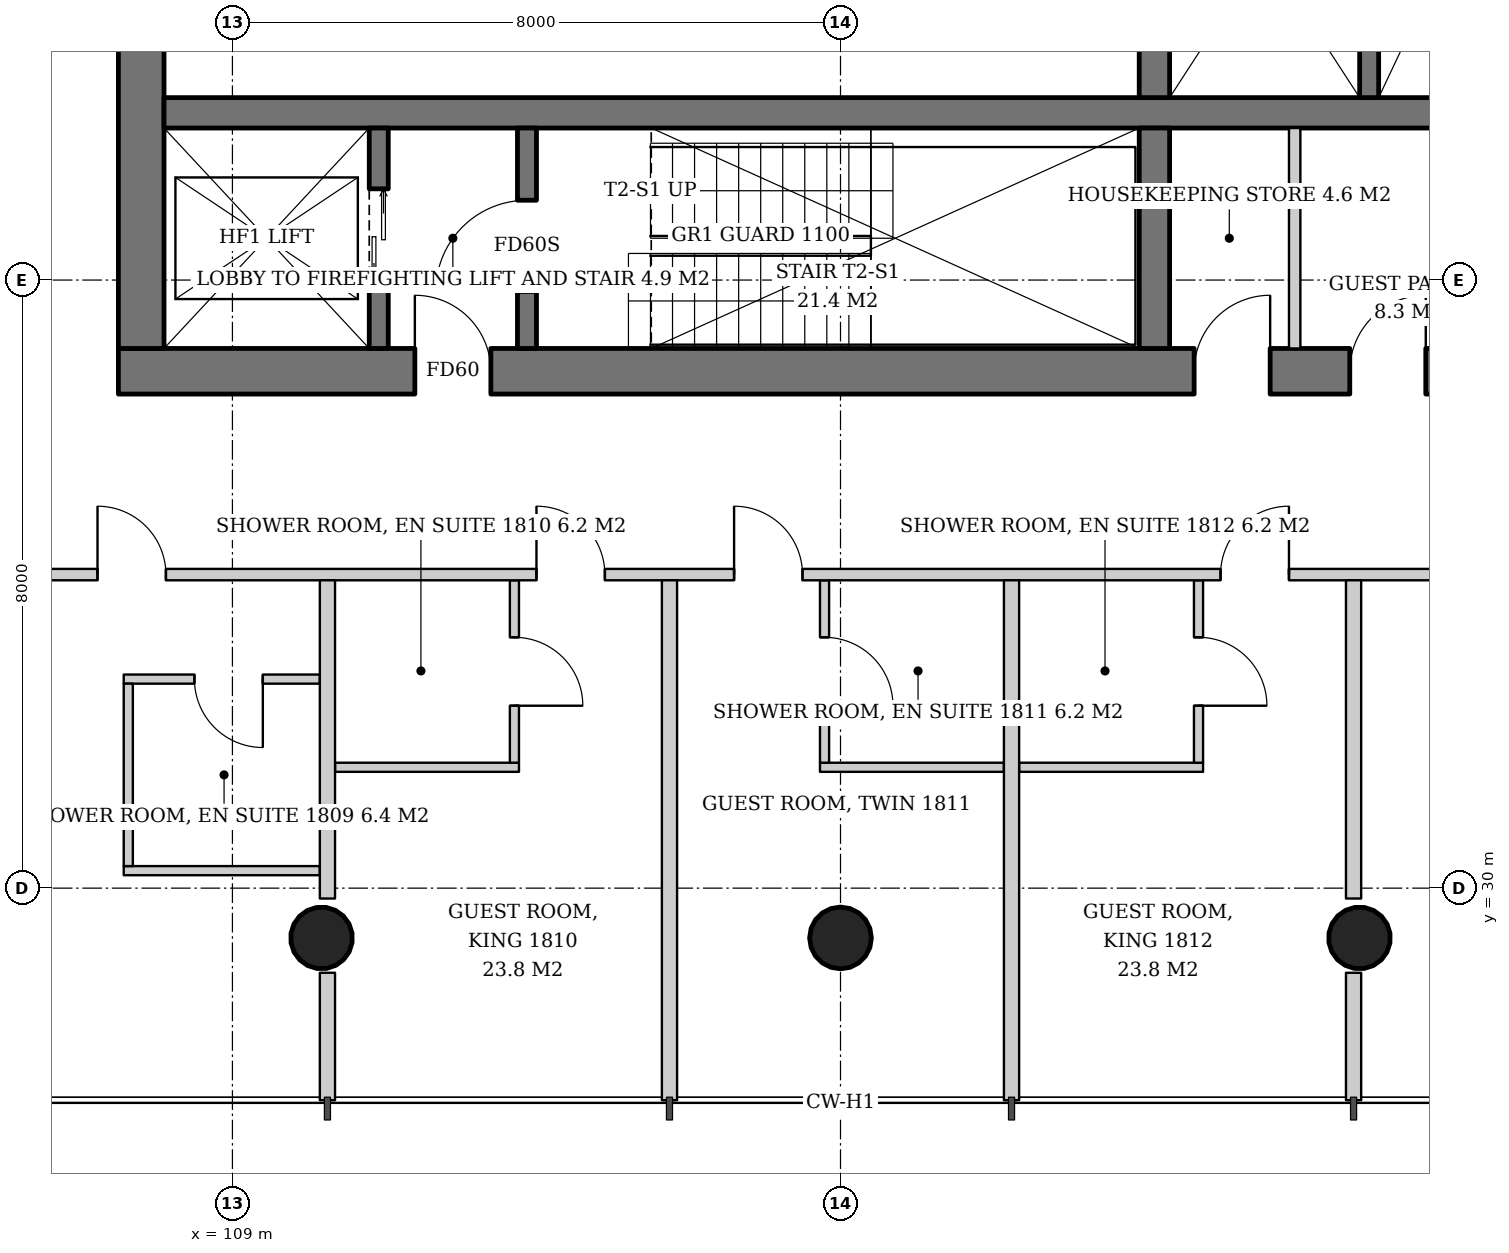
"""IFC4 building model, lengths in metres.
Left out: names, types, materials, properties, quantities, classifications, styles, units other than length and angle.
Written with IfcOpenShell. Run it as: python <this file> out.ifc"""

import sys

from ifc_helpers import new_model, si_unit, direction, frame, frame_2d, origin, origin_2d, place, context, subcontext, project, spatial, rectangle, hollow_circle, extrude, element, fill, save


model = new_model("IFC4")
c1 = context("Model", 3, precision=1e-05, world=origin(), true_north=direction((0.0, 1.0)))
c2 = subcontext(c1, "Body", "Model", "MODEL_VIEW")
j1 = project(units=[si_unit("LENGTHUNIT", "METRE"), si_unit("PLANEANGLEUNIT", "RADIAN")], contexts=[c1])
p1 = place(None, origin())
s1 = spatial("IfcSite", under=j1, at=p1, CompositionType="ELEMENT")
p2 = place(p1, origin())
s2 = spatial("IfcBuilding", under=s1, at=p2, CompositionType="ELEMENT")
p3 = place(p2, frame((0.0, 0.0, 74.2)))
s3 = spatial("IfcBuildingStorey", under=s2, at=p3, CompositionType="ELEMENT", Elevation=74.2)
p4 = place(p3, frame((110.146, 29.293, 0.0), z_axis=(0.021561908287, 0.042995471882, 0.998842566929), x_axis=(-0.89389288677, 0.448280611873, 0.0)))
e1 = element("IfcColumn", 1, at=p4, inside=s3, PredefinedType="COLUMN", context=c2, shape_type="SweptSolid", body=[
    extrude(hollow_circle(Radius=0.406, WallThickness=0.03, at=origin_2d()), origin(), (0.0, 0.0, 1.0), 3.804),
])
p5 = place(p3, frame((117.0, 29.293, 0.0), z_axis=(0.0, 0.043005470007, 0.999074836811), x_axis=(-1.0, 0.0, 0.0)))
e2 = element("IfcColumn", 2, at=p5, inside=s3, PredefinedType="COLUMN", context=c2, shape_type="SweptSolid", body=[
    extrude(hollow_circle(Radius=0.406, WallThickness=0.03, at=origin_2d()), origin(), (0.0, 0.0, 1.0), 3.803),
])
p6 = place(p3, frame((123.854, 29.293, 0.0), z_axis=(-0.021561908287, 0.042995471882, 0.998842566929), x_axis=(-0.89389288677, -0.448280611873, 0.0)))
e3 = element("IfcColumn", 3, at=p6, inside=s3, PredefinedType="COLUMN", context=c2, shape_type="SweptSolid", body=[
    extrude(hollow_circle(Radius=0.406, WallThickness=0.03, at=origin_2d()), origin(), (0.0, 0.0, 1.0), 3.804),
])
p7 = place(p3, frame((107.5, 36.8, 0.0), z_axis=(0.0, 0.0, 1.0), x_axis=(1.0, 0.0, 0.0)))
e4 = element("IfcWall", 4, at=p7, inside=s3, PredefinedType="SHEAR", context=c2, shape_type="SweptSolid", body=[
    extrude(rectangle(XDim=19.0, YDim=0.6, at=frame_2d((9.5, 0.0))), origin(), (0.0, 0.0, 1.0), 3.8),
])
p8 = place(p7, frame((3.9, 0.0, 0.0)))
e5 = element("IfcOpeningElement", 5, at=p8, cuts=e4, PredefinedType="OPENING", context=c2, shape_type="SweptSolid", body=[
    extrude(rectangle(XDim=1.0, YDim=2.1, at=frame_2d((0.5, 1.05))), frame((0.0, 0.31, 0.0), z_axis=(0.0, -1.0, 0.0), x_axis=(1.0, 0.0, 0.0)), (0.0, 0.0, 1.0), 0.62),
])
p9 = place(p7, frame((14.153, 0.0, 0.0)))
e6 = element("IfcOpeningElement", 6, at=p9, cuts=e4, PredefinedType="OPENING", context=c2, shape_type="SweptSolid", body=[
    extrude(rectangle(XDim=1.0, YDim=2.1, at=frame_2d((0.5, 1.05))), frame((0.0, 0.31, 0.0), z_axis=(0.0, -1.0, 0.0), x_axis=(1.0, 0.0, 0.0)), (0.0, 0.0, 1.0), 0.62),
])
p10 = place(p7, frame((16.2, 0.0, 0.0)))
e7 = element("IfcOpeningElement", 7, at=p10, cuts=e4, PredefinedType="OPENING", context=c2, shape_type="SweptSolid", body=[
    extrude(rectangle(XDim=1.0, YDim=2.1, at=frame_2d((0.5, 1.05))), frame((0.0, 0.31, 0.0), z_axis=(0.0, -1.0, 0.0), x_axis=(1.0, 0.0, 0.0)), (0.0, 0.0, 1.0), 0.62),
])
p11 = place(p3, frame((107.8, 37.1, 0.0), z_axis=(0.0, 0.0, 1.0), x_axis=(0.0, 1.0, 0.0)))
e8 = element("IfcWall", 8, at=p11, inside=s3, PredefinedType="SHEAR", context=c2, shape_type="SweptSolid", body=[
    extrude(rectangle(XDim=17.8, YDim=0.6, at=frame_2d((8.9, 0.0))), origin(), (0.0, 0.0, 1.0), 3.8),
])
p12 = place(p11, frame((8.0, 0.0, 0.0)))
e9 = element("IfcOpeningElement", 9, at=p12, cuts=e8, PredefinedType="OPENING", context=c2, shape_type="SweptSolid", body=[
    extrude(rectangle(XDim=1.8, YDim=2.4, at=frame_2d((0.9, 1.2))), frame((0.0, 0.31, 0.0), z_axis=(0.0, -1.0, 0.0), x_axis=(1.0, 0.0, 0.0)), (0.0, 0.0, 1.0), 0.62),
])
p13 = place(p3, frame((108.1, 40.2, 0.0), z_axis=(0.0, 0.0, 1.0), x_axis=(1.0, 0.0, 0.0)))
e10 = element("IfcWall", 10, at=p13, inside=s3, PredefinedType="SHEAR", context=c2, shape_type="SweptSolid", body=[
    extrude(rectangle(XDim=17.8, YDim=0.4, at=frame_2d((8.9, 0.0))), origin(), (0.0, 0.0, 1.0), 3.8),
])
p14 = place(p3, frame((121.13, 37.1, 0.0), z_axis=(0.0, 0.0, 1.0), x_axis=(0.0, 1.0, 0.0)))
e11 = element("IfcWall", 11, at=p14, inside=s3, PredefinedType="SHEAR", context=c2, shape_type="SweptSolid", body=[
    extrude(rectangle(XDim=2.9, YDim=0.4, at=frame_2d((1.45, 0.0))), origin(), (0.0, 0.0, 1.0), 3.8),
])
p15 = place(p3, frame((121.13, 40.4, 0.0), z_axis=(0.0, 0.0, 1.0), x_axis=(0.0, 1.0, 0.0)))
e12 = element("IfcWall", 12, at=p15, inside=s3, PredefinedType="SHEAR", context=c2, shape_type="SweptSolid", body=[
    extrude(rectangle(XDim=11.2, YDim=0.4, at=frame_2d((5.6, 0.0))), origin(), (0.0, 0.0, 1.0), 3.8),
])
p16 = place(p3, frame((110.925, 37.1, 0.0), z_axis=(0.0, 0.0, 1.0), x_axis=(0.0, 1.0, 0.0)))
e13 = element("IfcWall", 13, at=p16, inside=s3, PredefinedType="SHEAR", context=c2, shape_type="SweptSolid", body=[
    extrude(rectangle(XDim=2.9, YDim=0.25, at=frame_2d((1.45, 0.0))), origin(), (0.0, 0.0, 1.0), 3.8),
])
p17 = place(p16, frame((0.8, 0.0, 0.0)))
e14 = element("IfcOpeningElement", 14, at=p17, cuts=e13, PredefinedType="OPENING", context=c2, shape_type="SweptSolid", body=[
    extrude(rectangle(XDim=1.3, YDim=2.2, at=frame_2d((0.65, 1.1))), frame((0.0, 0.135, 0.0), z_axis=(0.0, -1.0, 0.0), x_axis=(1.0, 0.0, 0.0)), (0.0, 0.0, 1.0), 0.27),
])
p18 = place(p3, frame((112.875, 37.1, 0.0), z_axis=(0.0, 0.0, 1.0), x_axis=(0.0, 1.0, 0.0)))
e15 = element("IfcWall", 15, at=p18, inside=s3, PredefinedType="SHEAR", context=c2, shape_type="SweptSolid", body=[
    extrude(rectangle(XDim=2.9, YDim=0.25, at=frame_2d((1.45, 0.0))), origin(), (0.0, 0.0, 1.0), 3.8),
])
p19 = place(p18, frame((0.75, 0.0, 0.0)))
e16 = element("IfcOpeningElement", 16, at=p19, cuts=e15, PredefinedType="OPENING", context=c2, shape_type="SweptSolid", body=[
    extrude(rectangle(XDim=1.2, YDim=2.1, at=frame_2d((0.6, 1.05))), frame((0.0, 0.135, 0.0), z_axis=(0.0, -1.0, 0.0), x_axis=(1.0, 0.0, 0.0)), (0.0, 0.0, 1.0), 0.27),
])
p20 = place(p3, frame((123.955, 44.25, 0.0), z_axis=(0.0, 0.0, 1.0), x_axis=(0.0, -1.0, 0.0)))
e17 = element("IfcWall", 17, at=p20, inside=s3, PredefinedType="SHEAR", context=c2, shape_type="SweptSolid", body=[
    extrude(rectangle(XDim=3.85, YDim=0.25, at=frame_2d((1.925, 0.0))), origin(), (0.0, 0.0, 1.0), 3.8),
])
p21 = place(p3, frame((122.975, 37.1, 0.0), z_axis=(0.0, 0.0, 1.0), x_axis=(0.0, 1.0, 0.0)))
e18 = element("IfcWall", 18, at=p21, inside=s3, PredefinedType="SOLIDWALL", context=c2, shape_type="SweptSolid", body=[
    extrude(rectangle(XDim=2.9, YDim=0.15, at=frame_2d((1.45, 0.0))), origin(), (0.0, 0.0, 1.0), 3.6),
])
p22 = place(p3, frame((110.15, 32.75, 0.0), z_axis=(0.0, 0.0, 1.0), x_axis=(-1.0, 0.0, 0.0)))
e19 = element("IfcWall", 19, at=p22, inside=s3, PredefinedType="PARTITIONING", context=c2, shape_type="SweptSolid", body=[
    extrude(rectangle(XDim=2.58, YDim=0.12, at=frame_2d((1.29, 0.0))), origin(), (0.0, 0.0, 1.0), 2.8),
])
p23 = place(p22, frame((0.75, 0.0, 0.0)))
e20 = element("IfcOpeningElement", 20, at=p23, cuts=e19, PredefinedType="OPENING", context=c2, shape_type="SweptSolid", body=[
    extrude(rectangle(XDim=0.9, YDim=2.1, at=frame_2d((0.45, 1.05))), frame((0.0, 0.07, 0.0), z_axis=(0.0, -1.0, 0.0), x_axis=(1.0, 0.0, 0.0)), (0.0, 0.0, 1.0), 0.14),
])
p24 = place(p3, frame((110.15, 30.23, 0.0), z_axis=(0.0, 0.0, 1.0), x_axis=(-1.0, 0.0, 0.0)))
e21 = element("IfcWall", 21, at=p24, inside=s3, PredefinedType="PARTITIONING", context=c2, shape_type="SweptSolid", body=[
    extrude(rectangle(XDim=2.58, YDim=0.12, at=frame_2d((1.29, 0.0))), origin(), (0.0, 0.0, 1.0), 2.8),
])
p25 = place(p3, frame((107.63, 32.69, 0.0), z_axis=(0.0, 0.0, 1.0), x_axis=(0.0, -1.0, 0.0)))
e22 = element("IfcWall", 22, at=p25, inside=s3, PredefinedType="PARTITIONING", context=c2, shape_type="SweptSolid", body=[
    extrude(rectangle(XDim=2.4, YDim=0.12, at=frame_2d((1.2, 0.0))), origin(), (0.0, 0.0, 1.0), 2.8),
])
p26 = place(p3, frame((110.35, 31.59, 0.0), z_axis=(0.0, 0.0, 1.0), x_axis=(1.0, 0.0, 0.0)))
e23 = element("IfcWall", 23, at=p26, inside=s3, PredefinedType="PARTITIONING", context=c2, shape_type="SweptSolid", body=[
    extrude(rectangle(XDim=2.42, YDim=0.12, at=frame_2d((1.21, 0.0))), origin(), (0.0, 0.0, 1.0), 2.847),
])
p27 = place(p3, frame((112.71, 34.05, 0.0), z_axis=(0.0, 0.0, 1.0), x_axis=(0.0, -1.0, 0.0)))
e24 = element("IfcWall", 24, at=p27, inside=s3, PredefinedType="PARTITIONING", context=c2, shape_type="SweptSolid", body=[
    extrude(rectangle(XDim=2.4, YDim=0.12, at=frame_2d((1.2, 0.0))), origin(), (0.0, 0.0, 1.0), 3.6),
])
p28 = place(p27, frame((0.75, 0.0, 0.0)))
e25 = element("IfcOpeningElement", 25, at=p28, cuts=e24, PredefinedType="OPENING", context=c2, shape_type="SweptSolid", body=[
    extrude(rectangle(XDim=0.9, YDim=2.1, at=frame_2d((0.45, 1.05))), frame((0.0, 0.07, 0.0), z_axis=(0.0, -1.0, 0.0), x_axis=(1.0, 0.0, 0.0)), (0.0, 0.0, 1.0), 0.14),
])
p29 = place(p3, frame((116.73, 31.59, 0.0), z_axis=(0.0, 0.0, 1.0), x_axis=(1.0, 0.0, 0.0)))
e26 = element("IfcWall", 26, at=p29, inside=s3, PredefinedType="PARTITIONING", context=c2, shape_type="SweptSolid", body=[
    extrude(rectangle(XDim=2.42, YDim=0.12, at=frame_2d((1.21, 0.0))), origin(), (0.0, 0.0, 1.0), 3.6),
])
p30 = place(p3, frame((116.79, 34.05, 0.0), z_axis=(0.0, 0.0, 1.0), x_axis=(0.0, -1.0, 0.0)))
e27 = element("IfcWall", 27, at=p30, inside=s3, PredefinedType="PARTITIONING", context=c2, shape_type="SweptSolid", body=[
    extrude(rectangle(XDim=2.4, YDim=0.12, at=frame_2d((1.2, 0.0))), origin(), (0.0, 0.0, 1.0), 3.6),
])
p31 = place(p30, frame((0.75, 0.0, 0.0)))
e28 = element("IfcOpeningElement", 28, at=p31, cuts=e27, PredefinedType="OPENING", context=c2, shape_type="SweptSolid", body=[
    extrude(rectangle(XDim=0.9, YDim=2.1, at=frame_2d((0.45, 1.05))), frame((0.0, 0.07, 0.0), z_axis=(0.0, -1.0, 0.0), x_axis=(1.0, 0.0, 0.0)), (0.0, 0.0, 1.0), 0.14),
])
p32 = place(p3, frame((119.35, 31.59, 0.0), z_axis=(0.0, 0.0, 1.0), x_axis=(1.0, 0.0, 0.0)))
e29 = element("IfcWall", 29, at=p32, inside=s3, PredefinedType="PARTITIONING", context=c2, shape_type="SweptSolid", body=[
    extrude(rectangle(XDim=2.42, YDim=0.12, at=frame_2d((1.21, 0.0))), origin(), (0.0, 0.0, 1.0), 2.847),
])
p33 = place(p3, frame((121.71, 34.05, 0.0), z_axis=(0.0, 0.0, 1.0), x_axis=(0.0, -1.0, 0.0)))
e30 = element("IfcWall", 30, at=p33, inside=s3, PredefinedType="PARTITIONING", context=c2, shape_type="SweptSolid", body=[
    extrude(rectangle(XDim=2.4, YDim=0.12, at=frame_2d((1.2, 0.0))), origin(), (0.0, 0.0, 1.0), 3.6),
])
p34 = place(p33, frame((0.75, 0.0, 0.0)))
e31 = element("IfcOpeningElement", 31, at=p34, cuts=e30, PredefinedType="OPENING", context=c2, shape_type="SweptSolid", body=[
    extrude(rectangle(XDim=0.9, YDim=2.1, at=frame_2d((0.45, 1.05))), frame((0.0, 0.07, 0.0), z_axis=(0.0, -1.0, 0.0), x_axis=(1.0, 0.0, 0.0)), (0.0, 0.0, 1.0), 0.14),
])
p35 = place(p3, frame((105.05, 34.125, 0.0), z_axis=(0.0, 0.0, 1.0), x_axis=(1.0, 0.0, 0.0)))
e32 = element("IfcWall", 32, at=p35, inside=s3, PredefinedType="PARTITIONING", context=c2, shape_type="SweptSolid", body=[
    extrude(rectangle(XDim=23.75, YDim=0.15, at=frame_2d((11.875, 0.0))), origin(), (0.0, 0.0, 1.0), 2.8),
])
p36 = place(p35, frame((2.175, 0.0, 0.0)))
e33 = element("IfcOpeningElement", 33, at=p36, cuts=e32, PredefinedType="OPENING", context=c2, shape_type="SweptSolid", body=[
    extrude(rectangle(XDim=0.9, YDim=2.1, at=frame_2d((0.45, 1.05))), frame((0.0, 0.085, 0.0), z_axis=(0.0, -1.0, 0.0), x_axis=(1.0, 0.0, 0.0)), (0.0, 0.0, 1.0), 0.17),
])
p37 = place(p35, frame((7.95, 0.0, 0.0)))
e34 = element("IfcOpeningElement", 34, at=p37, cuts=e32, PredefinedType="OPENING", context=c2, shape_type="SweptSolid", body=[
    extrude(rectangle(XDim=0.9, YDim=2.1, at=frame_2d((0.45, 1.05))), frame((0.0, 0.085, 0.0), z_axis=(0.0, -1.0, 0.0), x_axis=(1.0, 0.0, 0.0)), (0.0, 0.0, 1.0), 0.17),
])
p38 = place(p35, frame((10.55, 0.0, 0.0)))
e35 = element("IfcOpeningElement", 35, at=p38, cuts=e32, PredefinedType="OPENING", context=c2, shape_type="SweptSolid", body=[
    extrude(rectangle(XDim=0.9, YDim=2.1, at=frame_2d((0.45, 1.05))), frame((0.0, 0.085, 0.0), z_axis=(0.0, -1.0, 0.0), x_axis=(1.0, 0.0, 0.0)), (0.0, 0.0, 1.0), 0.17),
])
p39 = place(p35, frame((16.95, 0.0, 0.0)))
e36 = element("IfcOpeningElement", 36, at=p39, cuts=e32, PredefinedType="OPENING", context=c2, shape_type="SweptSolid", body=[
    extrude(rectangle(XDim=0.9, YDim=2.1, at=frame_2d((0.45, 1.05))), frame((0.0, 0.085, 0.0), z_axis=(0.0, -1.0, 0.0), x_axis=(1.0, 0.0, 0.0)), (0.0, 0.0, 1.0), 0.17),
])
p40 = place(p3, frame((110.25, 34.05, 0.0), z_axis=(0.0, 0.0, 1.0), x_axis=(0.0, -1.0, 0.0)))
e37 = element("IfcWall", 37, at=p40, inside=s3, PredefinedType="PARTITIONING", context=c2, shape_type="SweptSolid", body=[
    extrude(rectangle(XDim=4.187, YDim=0.2, at=frame_2d((2.093, 0.0))), origin(), (0.0, 0.0, 1.0), 3.6),
])
p41 = place(p3, frame((110.25, 28.887, 0.0), z_axis=(0.0, 0.0, 1.0), x_axis=(0.0, -1.0, 0.0)))
e38 = element("IfcWall", 38, at=p41, inside=s3, PredefinedType="PARTITIONING", context=c2, shape_type="SweptSolid", body=[
    extrude(rectangle(XDim=1.677, YDim=0.2, at=frame_2d((0.838, 0.0))), origin(), (0.0, 0.0, 1.0), 3.6),
])
for number, where, z_axis, x_axis in (
    (39, (114.75, 34.05, 0.0), (0.0, 0.0, 1.0), (0.0, -1.0, 0.0)),
    (40, (119.25, 34.05, 0.0), (0.0, 0.0, 1.0), (0.0, -1.0, 0.0)),
):
    element("IfcWall", number, at=place(p3, frame(where, z_axis=z_axis, x_axis=x_axis)), inside=s3, PredefinedType="PARTITIONING", context=c2, shape_type="SweptSolid", body=[
        extrude(rectangle(XDim=6.84, YDim=0.2, at=frame_2d((3.42, 0.0))), origin(), (0.0, 0.0, 1.0), 3.05),
    ])
p42 = place(p3, frame((123.75, 34.05, 0.0), z_axis=(0.0, 0.0, 1.0), x_axis=(0.0, -1.0, 0.0)))
e41 = element("IfcWall", 41, at=p42, inside=s3, PredefinedType="PARTITIONING", context=c2, shape_type="SweptSolid", body=[
    extrude(rectangle(XDim=4.187, YDim=0.2, at=frame_2d((2.093, 0.0))), origin(), (0.0, 0.0, 1.0), 3.6),
])
p43 = place(p3, frame((123.75, 28.887, 0.0), z_axis=(0.0, 0.0, 1.0), x_axis=(0.0, -1.0, 0.0)))
e42 = element("IfcWall", 42, at=p43, inside=s3, PredefinedType="PARTITIONING", context=c2, shape_type="SweptSolid", body=[
    extrude(rectangle(XDim=1.677, YDim=0.2, at=frame_2d((0.838, 0.0))), origin(), (0.0, 0.0, 1.0), 3.6),
])
p44 = place(p17, origin())
e43 = element("IfcDoor", 43, at=p44, inside=s3, OperationType="DOUBLE_DOOR_SLIDING", PredefinedType="DOOR", context=c2, shape_type="SweptSolid", body=[
    extrude(rectangle(XDim=1.3, YDim=2.2, at=frame_2d((0.65, 1.1))), frame((0.0, 0.025, 0.0), z_axis=(0.0, -1.0, 0.0), x_axis=(1.0, 0.0, 0.0)), (0.0, 0.0, 1.0), 0.05),
])
fill(e14, e43)
p45 = place(p19, origin())
e44 = element("IfcDoor", 44, at=p45, inside=s3, OperationType="SINGLE_SWING_LEFT", PredefinedType="DOOR", context=c2, shape_type="SweptSolid", body=[
    extrude(rectangle(XDim=1.2, YDim=2.1, at=frame_2d((0.6, 1.05))), frame((0.0, 0.025, 0.0), z_axis=(0.0, -1.0, 0.0), x_axis=(1.0, 0.0, 0.0)), (0.0, 0.0, 1.0), 0.05),
])
fill(e16, e44)
p46 = place(p8, origin())
e45 = element("IfcDoor", 45, at=p46, inside=s3, OperationType="SINGLE_SWING_LEFT", PredefinedType="DOOR", context=c2, shape_type="SweptSolid", body=[
    extrude(rectangle(XDim=1.0, YDim=2.1, at=frame_2d((0.5, 1.05))), frame((0.0, 0.025, 0.0), z_axis=(0.0, -1.0, 0.0), x_axis=(1.0, 0.0, 0.0)), (0.0, 0.0, 1.0), 0.05),
])
fill(e5, e45)
p47 = place(p9, origin())
e46 = element("IfcDoor", 46, at=p47, inside=s3, OperationType="SINGLE_SWING_RIGHT", PredefinedType="DOOR", context=c2, shape_type="SweptSolid", body=[
    extrude(rectangle(XDim=1.0, YDim=2.1, at=frame_2d((0.5, 1.05))), frame((0.0, 0.29, 0.0), z_axis=(0.0, -1.0, 0.0), x_axis=(1.0, 0.0, 0.0)), (0.0, 0.0, 1.0), 0.05),
])
fill(e6, e46)
p48 = place(p10, origin())
e47 = element("IfcDoor", 47, at=p48, inside=s3, OperationType="SINGLE_SWING_RIGHT", PredefinedType="DOOR", context=c2, shape_type="SweptSolid", body=[
    extrude(rectangle(XDim=1.0, YDim=2.1, at=frame_2d((0.5, 1.05))), frame((0.0, 0.29, 0.0), z_axis=(0.0, -1.0, 0.0), x_axis=(1.0, 0.0, 0.0)), (0.0, 0.0, 1.0), 0.05),
])
fill(e7, e47)
p49 = place(p23, origin())
e48 = element("IfcDoor", 48, at=p49, inside=s3, OperationType="SINGLE_SWING_LEFT", PredefinedType="DOOR", context=c2, shape_type="SweptSolid", body=[
    extrude(rectangle(XDim=0.9, YDim=2.1, at=frame_2d((0.45, 1.05))), frame((0.0, 0.025, 0.0), z_axis=(0.0, -1.0, 0.0), x_axis=(1.0, 0.0, 0.0)), (0.0, 0.0, 1.0), 0.05),
])
fill(e20, e48)
p50 = place(p28, origin())
e49 = element("IfcDoor", 49, at=p50, inside=s3, OperationType="SINGLE_SWING_RIGHT", PredefinedType="DOOR", context=c2, shape_type="SweptSolid", body=[
    extrude(rectangle(XDim=0.9, YDim=2.1, at=frame_2d((0.45, 1.05))), frame((0.0, 0.025, 0.0), z_axis=(0.0, -1.0, 0.0), x_axis=(1.0, 0.0, 0.0)), (0.0, 0.0, 1.0), 0.05),
])
fill(e25, e49)
p51 = place(p31, origin())
e50 = element("IfcDoor", 50, at=p51, inside=s3, OperationType="SINGLE_SWING_RIGHT", PredefinedType="DOOR", context=c2, shape_type="SweptSolid", body=[
    extrude(rectangle(XDim=0.9, YDim=2.1, at=frame_2d((0.45, 1.05))), frame((0.0, 0.025, 0.0), z_axis=(0.0, -1.0, 0.0), x_axis=(1.0, 0.0, 0.0)), (0.0, 0.0, 1.0), 0.05),
])
fill(e28, e50)
p52 = place(p34, origin())
e51 = element("IfcDoor", 51, at=p52, inside=s3, OperationType="SINGLE_SWING_RIGHT", PredefinedType="DOOR", context=c2, shape_type="SweptSolid", body=[
    extrude(rectangle(XDim=0.9, YDim=2.1, at=frame_2d((0.45, 1.05))), frame((0.0, 0.025, 0.0), z_axis=(0.0, -1.0, 0.0), x_axis=(1.0, 0.0, 0.0)), (0.0, 0.0, 1.0), 0.05),
])
fill(e31, e51)
p53 = place(p36, origin())
e52 = element("IfcDoor", 52, at=p53, inside=s3, OperationType="SINGLE_SWING_LEFT", PredefinedType="DOOR", context=c2, shape_type="SweptSolid", body=[
    extrude(rectangle(XDim=0.9, YDim=2.1, at=frame_2d((0.45, 1.05))), frame((0.0, 0.025, 0.0), z_axis=(0.0, -1.0, 0.0), x_axis=(1.0, 0.0, 0.0)), (0.0, 0.0, 1.0), 0.05),
])
fill(e33, e52)
p54 = place(p37, origin())
e53 = element("IfcDoor", 53, at=p54, inside=s3, OperationType="SINGLE_SWING_LEFT", PredefinedType="DOOR", context=c2, shape_type="SweptSolid", body=[
    extrude(rectangle(XDim=0.9, YDim=2.1, at=frame_2d((0.45, 1.05))), frame((0.0, 0.025, 0.0), z_axis=(0.0, -1.0, 0.0), x_axis=(1.0, 0.0, 0.0)), (0.0, 0.0, 1.0), 0.05),
])
fill(e34, e53)
p55 = place(p38, origin())
e54 = element("IfcDoor", 54, at=p55, inside=s3, OperationType="SINGLE_SWING_LEFT", PredefinedType="DOOR", context=c2, shape_type="SweptSolid", body=[
    extrude(rectangle(XDim=0.9, YDim=2.1, at=frame_2d((0.45, 1.05))), frame((0.0, 0.025, 0.0), z_axis=(0.0, -1.0, 0.0), x_axis=(1.0, 0.0, 0.0)), (0.0, 0.0, 1.0), 0.05),
])
fill(e35, e54)
p56 = place(p39, origin())
e55 = element("IfcDoor", 55, at=p56, inside=s3, OperationType="SINGLE_SWING_RIGHT", PredefinedType="DOOR", context=c2, shape_type="SweptSolid", body=[
    extrude(rectangle(XDim=0.9, YDim=2.1, at=frame_2d((0.45, 1.05))), frame((0.0, 0.025, 0.0), z_axis=(0.0, -1.0, 0.0), x_axis=(1.0, 0.0, 0.0)), (0.0, 0.0, 1.0), 0.05),
])
fill(e36, e55)
save(model, sys.argv[1])
